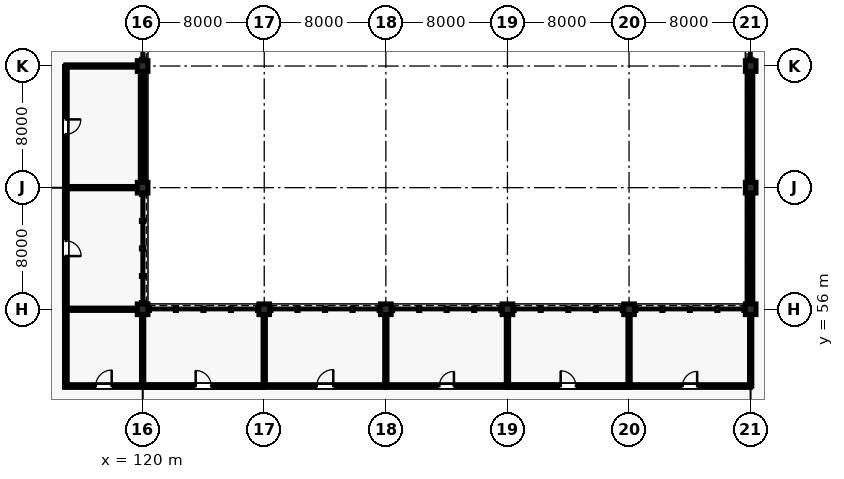
"""IFC4 building model, lengths in metres.
Left out: names, types, materials, properties, quantities, classifications, styles, units other than length and angle.
Written with IfcOpenShell. Run it as: python <this file> out.ifc"""

import sys

from ifc_helpers import new_model, si_unit, direction, frame, frame_2d, origin, origin_2d, place, context, subcontext, project, spatial, rectangle, extrude, element, fill, save


model = new_model("IFC4")
c1 = context("Model", 3, precision=1e-05, world=origin(), true_north=direction((0.0, 1.0)))
c2 = subcontext(c1, "Body", "Model", "MODEL_VIEW")
j1 = project(units=[si_unit("LENGTHUNIT", "METRE"), si_unit("PLANEANGLEUNIT", "RADIAN")], contexts=[c1])
p1 = place(None, origin())
s1 = spatial("IfcSite", under=j1, at=p1, CompositionType="ELEMENT")
p2 = place(p1, origin())
s2 = spatial("IfcBuilding", under=s1, at=p2, CompositionType="ELEMENT")
p3 = place(p2, origin())
s3 = spatial("IfcBuildingStorey", under=s2, at=p3, CompositionType="ELEMENT", Elevation=0.0)
for number, where, z_axis, x_axis in (
    (1, (120.0, 56.0, 0.0), (0.0, 0.0, 1.0), (1.0, 0.0, 0.0)),
    (2, (120.0, 64.0, 0.0), (0.0, 0.0, 1.0), (1.0, 0.0, 0.0)),
    (3, (120.0, 72.0, 0.0), (0.0, 0.0, 1.0), (1.0, 0.0, 0.0)),
    (4, (128.0, 56.0, 0.0), (0.0, 0.0, 1.0), (1.0, 0.0, 0.0)),
    (5, (136.0, 56.0, 0.0), (0.0, 0.0, 1.0), (1.0, 0.0, 0.0)),
    (6, (144.0, 56.0, 0.0), (0.0, 0.0, 1.0), (1.0, 0.0, 0.0)),
    (7, (152.0, 56.0, 0.0), (0.0, 0.0, 1.0), (1.0, 0.0, 0.0)),
    (8, (160.0, 56.0, 0.0), (0.0, 0.0, 1.0), (1.0, 0.0, 0.0)),
    (9, (160.0, 64.0, 0.0), (0.0, 0.0, 1.0), (1.0, 0.0, 0.0)),
    (10, (160.0, 72.0, 0.0), (0.0, 0.0, 1.0), (1.0, 0.0, 0.0)),
):
    element("IfcColumn", number, at=place(p3, frame(where, z_axis=z_axis, x_axis=x_axis)), inside=s3, PredefinedType="COLUMN", context=c2, shape_type="SweptSolid", body=[
        extrude(rectangle(XDim=0.7, YDim=0.7, at=origin_2d()), origin(), (0.0, 0.0, 1.0), 5.28),
    ])
p4 = place(p3, frame((120.0, 64.335, 0.0), z_axis=(0.0, 0.0, 1.0), x_axis=(0.0, 1.0, 0.0)))
e11 = element("IfcWall", 11, at=p4, inside=s3, PredefinedType="SOLIDWALL", context=c2, shape_type="SweptSolid", body=[
    extrude(rectangle(XDim=7.33, YDim=0.305, at=frame_2d((3.665, 0.0))), origin(), (0.0, 0.0, 1.0), 4.677),
])
p5 = place(p4, frame((2.74, 0.0, 0.9)))
e12 = element("IfcOpeningElement", 12, at=p5, cuts=e11, PredefinedType="OPENING", context=c2, shape_type="SweptSolid", body=[
    extrude(rectangle(XDim=1.85, YDim=2.65, at=frame_2d((0.925, 1.325))), frame((0.0, 0.162, 0.0), z_axis=(0.0, -1.0, 0.0), x_axis=(1.0, 0.0, 0.0)), (0.0, 0.0, 1.0), 0.325),
])
p6 = place(p3, frame((160.0, 56.335, 0.0), z_axis=(0.0, 0.0, 1.0), x_axis=(0.0, 1.0, 0.0)))
e13 = element("IfcWall", 13, at=p6, inside=s3, PredefinedType="SOLIDWALL", context=c2, shape_type="SweptSolid", body=[
    extrude(rectangle(XDim=7.33, YDim=0.28, at=frame_2d((3.665, 0.0))), origin(), (0.0, 0.0, 1.0), 4.682),
])
p7 = place(p6, frame((0.644, 0.0, 0.95)))
e14 = element("IfcOpeningElement", 14, at=p7, cuts=e13, PredefinedType="OPENING", context=c2, shape_type="SweptSolid", body=[
    extrude(rectangle(XDim=1.35, YDim=1.9, at=frame_2d((0.675, 0.95))), frame((0.0, 0.15, 0.0), z_axis=(0.0, -1.0, 0.0), x_axis=(1.0, 0.0, 0.0)), (0.0, 0.0, 1.0), 0.3),
])
p8 = place(p6, frame((5.336, 0.0, 0.95)))
e15 = element("IfcOpeningElement", 15, at=p8, cuts=e13, PredefinedType="OPENING", context=c2, shape_type="SweptSolid", body=[
    extrude(rectangle(XDim=1.35, YDim=1.9, at=frame_2d((0.675, 0.95))), frame((0.0, 0.15, 0.0), z_axis=(0.0, -1.0, 0.0), x_axis=(1.0, 0.0, 0.0)), (0.0, 0.0, 1.0), 0.3),
])
p9 = place(p3, frame((160.0, 64.335, 0.0), z_axis=(0.0, 0.0, 1.0), x_axis=(0.0, 1.0, 0.0)))
e16 = element("IfcWall", 16, at=p9, inside=s3, PredefinedType="SOLIDWALL", context=c2, shape_type="SweptSolid", body=[
    extrude(rectangle(XDim=7.33, YDim=0.28, at=frame_2d((3.665, 0.0))), origin(), (0.0, 0.0, 1.0), 4.615),
])
p10 = place(p9, frame((0.719, 0.0, 0.95)))
e17 = element("IfcOpeningElement", 17, at=p10, cuts=e16, PredefinedType="OPENING", context=c2, shape_type="SweptSolid", body=[
    extrude(rectangle(XDim=1.2, YDim=1.8, at=frame_2d((0.6, 0.9))), frame((0.0, 0.15, 0.0), z_axis=(0.0, -1.0, 0.0), x_axis=(1.0, 0.0, 0.0)), (0.0, 0.0, 1.0), 0.3),
])
p11 = place(p9, frame((5.411, 0.0, 0.95)))
e18 = element("IfcOpeningElement", 18, at=p11, cuts=e16, PredefinedType="OPENING", context=c2, shape_type="SweptSolid", body=[
    extrude(rectangle(XDim=1.2, YDim=1.8, at=frame_2d((0.6, 0.9))), frame((0.0, 0.15, 0.0), z_axis=(0.0, -1.0, 0.0), x_axis=(1.0, 0.0, 0.0)), (0.0, 0.0, 1.0), 0.3),
])
p12 = place(p3, frame((114.9, 50.95, 0.0), z_axis=(0.0, 0.0, 1.0), x_axis=(1.0, 0.0, 0.0)))
e19 = element("IfcWall", 19, at=p12, inside=s3, PredefinedType="PARTITIONING", context=c2, shape_type="SweptSolid", body=[
    extrude(rectangle(XDim=5.08, YDim=0.175, at=frame_2d((2.54, 0.0))), origin(), (0.0, 0.0, 1.0), 4.412),
])
p13 = place(p12, frame((2.015, 0.0, 0.0)))
e20 = element("IfcOpeningElement", 20, at=p13, cuts=e19, PredefinedType="OPENING", context=c2, shape_type="SweptSolid", body=[
    extrude(rectangle(XDim=1.05, YDim=2.15, at=frame_2d((0.525, 1.075))), frame((0.0, 0.097, 0.0), z_axis=(0.0, -1.0, 0.0), x_axis=(1.0, 0.0, 0.0)), (0.0, 0.0, 1.0), 0.195),
])
p14 = place(p3, frame((114.95, 50.9, 0.0), z_axis=(0.0, 0.0, 1.0), x_axis=(0.0, 1.0, 0.0)))
e21 = element("IfcWall", 21, at=p14, inside=s3, PredefinedType="PARTITIONING", context=c2, shape_type="SweptSolid", body=[
    extrude(rectangle(XDim=5.08, YDim=0.175, at=frame_2d((2.54, 0.0))), origin(), (0.0, 0.0, 1.0), 4.403),
])
p15 = place(p3, frame((114.95, 56.0, 0.0), z_axis=(0.0, 0.0, 1.0), x_axis=(1.0, 0.0, 0.0)))
e22 = element("IfcWall", 22, at=p15, inside=s3, PredefinedType="PARTITIONING", context=c2, shape_type="SweptSolid", body=[
    extrude(rectangle(XDim=4.69, YDim=0.15, at=frame_2d((2.345, 0.0))), origin(), (0.0, 0.0, 1.0), 4.403),
])
p16 = place(p3, frame((120.0, 50.95, 0.0), z_axis=(0.0, 0.0, 1.0), x_axis=(0.0, 1.0, 0.0)))
e23 = element("IfcWall", 23, at=p16, inside=s3, PredefinedType="PARTITIONING", context=c2, shape_type="SweptSolid", body=[
    extrude(rectangle(XDim=4.69, YDim=0.15, at=frame_2d((2.345, 0.0))), origin(), (0.0, 0.0, 1.0), 4.412),
])
p17 = place(p3, frame((114.95, 56.02, 0.0), z_axis=(0.0, 0.0, 1.0), x_axis=(0.0, 1.0, 0.0)))
e24 = element("IfcWall", 24, at=p17, inside=s3, PredefinedType="PARTITIONING", context=c2, shape_type="SweptSolid", body=[
    extrude(rectangle(XDim=7.96, YDim=0.185, at=frame_2d((3.98, 0.0))), origin(), (0.0, 0.0, 1.0), 4.336),
])
p18 = place(p17, frame((3.48, 0.0, 0.0)))
e25 = element("IfcOpeningElement", 25, at=p18, cuts=e24, PredefinedType="OPENING", context=c2, shape_type="SweptSolid", body=[
    extrude(rectangle(XDim=1.0, YDim=2.15, at=frame_2d((0.5, 1.075))), frame((0.0, 0.103, 0.0), z_axis=(0.0, -1.0, 0.0), x_axis=(1.0, 0.0, 0.0)), (0.0, 0.0, 1.0), 0.205),
])
p19 = place(p3, frame((114.95, 64.0, 0.0), z_axis=(0.0, 0.0, 1.0), x_axis=(1.0, 0.0, 0.0)))
e26 = element("IfcWall", 26, at=p19, inside=s3, PredefinedType="PARTITIONING", context=c2, shape_type="SweptSolid", body=[
    extrude(rectangle(XDim=4.69, YDim=0.15, at=frame_2d((2.345, 0.0))), origin(), (0.0, 0.0, 1.0), 4.336),
])
p20 = place(p3, frame((114.95, 64.02, 0.0), z_axis=(0.0, 0.0, 1.0), x_axis=(0.0, 1.0, 0.0)))
e27 = element("IfcWall", 27, at=p20, inside=s3, PredefinedType="PARTITIONING", context=c2, shape_type="SweptSolid", body=[
    extrude(rectangle(XDim=7.96, YDim=0.175, at=frame_2d((3.98, 0.0))), origin(), (0.0, 0.0, 1.0), 4.336),
])
p21 = place(p20, frame((3.49, 0.0, 0.0)))
e28 = element("IfcOpeningElement", 28, at=p21, cuts=e27, PredefinedType="OPENING", context=c2, shape_type="SweptSolid", body=[
    extrude(rectangle(XDim=0.98, YDim=2.15, at=frame_2d((0.49, 1.075))), frame((0.0, 0.097, 0.0), z_axis=(0.0, -1.0, 0.0), x_axis=(1.0, 0.0, 0.0)), (0.0, 0.0, 1.0), 0.195),
])
p22 = place(p3, frame((114.95, 72.0, 0.0), z_axis=(0.0, 0.0, 1.0), x_axis=(1.0, 0.0, 0.0)))
e29 = element("IfcWall", 29, at=p22, inside=s3, PredefinedType="PARTITIONING", context=c2, shape_type="SweptSolid", body=[
    extrude(rectangle(XDim=4.69, YDim=0.15, at=frame_2d((2.345, 0.0))), origin(), (0.0, 0.0, 1.0), 4.404),
])
p23 = place(p3, frame((120.02, 50.95, 0.0), z_axis=(0.0, 0.0, 1.0), x_axis=(1.0, 0.0, 0.0)))
e30 = element("IfcWall", 30, at=p23, inside=s3, PredefinedType="PARTITIONING", context=c2, shape_type="SweptSolid", body=[
    extrude(rectangle(XDim=7.96, YDim=0.185, at=frame_2d((3.98, 0.0))), origin(), (0.0, 0.0, 1.0), 4.404),
])
p24 = place(p23, frame((3.47, 0.0, 0.0)))
e31 = element("IfcOpeningElement", 31, at=p24, cuts=e30, PredefinedType="OPENING", context=c2, shape_type="SweptSolid", body=[
    extrude(rectangle(XDim=1.02, YDim=2.2, at=frame_2d((0.51, 1.1))), frame((0.0, 0.103, 0.0), z_axis=(0.0, -1.0, 0.0), x_axis=(1.0, 0.0, 0.0)), (0.0, 0.0, 1.0), 0.205),
])
p25 = place(p3, frame((128.0, 50.95, 0.0), z_axis=(0.0, 0.0, 1.0), x_axis=(0.0, 1.0, 0.0)))
e32 = element("IfcWall", 32, at=p25, inside=s3, PredefinedType="PARTITIONING", context=c2, shape_type="SweptSolid", body=[
    extrude(rectangle(XDim=4.69, YDim=0.15, at=frame_2d((2.345, 0.0))), origin(), (0.0, 0.0, 1.0), 4.404),
])
p26 = place(p3, frame((128.02, 50.95, 0.0), z_axis=(0.0, 0.0, 1.0), x_axis=(1.0, 0.0, 0.0)))
e33 = element("IfcWall", 33, at=p26, inside=s3, PredefinedType="PARTITIONING", context=c2, shape_type="SweptSolid", body=[
    extrude(rectangle(XDim=7.96, YDim=0.175, at=frame_2d((3.98, 0.0))), origin(), (0.0, 0.0, 1.0), 4.404),
])
p27 = place(p26, frame((3.44, 0.0, 0.0)))
e34 = element("IfcOpeningElement", 34, at=p27, cuts=e33, PredefinedType="OPENING", context=c2, shape_type="SweptSolid", body=[
    extrude(rectangle(XDim=1.08, YDim=2.2, at=frame_2d((0.54, 1.1))), frame((0.0, 0.097, 0.0), z_axis=(0.0, -1.0, 0.0), x_axis=(1.0, 0.0, 0.0)), (0.0, 0.0, 1.0), 0.195),
])
p28 = place(p3, frame((136.0, 50.95, 0.0), z_axis=(0.0, 0.0, 1.0), x_axis=(0.0, 1.0, 0.0)))
e35 = element("IfcWall", 35, at=p28, inside=s3, PredefinedType="PARTITIONING", context=c2, shape_type="SweptSolid", body=[
    extrude(rectangle(XDim=4.69, YDim=0.15, at=frame_2d((2.345, 0.0))), origin(), (0.0, 0.0, 1.0), 4.471),
])
p29 = place(p3, frame((136.02, 50.95, 0.0), z_axis=(0.0, 0.0, 1.0), x_axis=(1.0, 0.0, 0.0)))
e36 = element("IfcWall", 36, at=p29, inside=s3, PredefinedType="PARTITIONING", context=c2, shape_type="SweptSolid", body=[
    extrude(rectangle(XDim=7.96, YDim=0.175, at=frame_2d((3.98, 0.0))), origin(), (0.0, 0.0, 1.0), 4.403),
])
p30 = place(p29, frame((3.5, 0.0, 0.0)))
e37 = element("IfcOpeningElement", 37, at=p30, cuts=e36, PredefinedType="OPENING", context=c2, shape_type="SweptSolid", body=[
    extrude(rectangle(XDim=0.96, YDim=2.14, at=frame_2d((0.48, 1.07))), frame((0.0, 0.097, 0.0), z_axis=(0.0, -1.0, 0.0), x_axis=(1.0, 0.0, 0.0)), (0.0, 0.0, 1.0), 0.195),
])
p31 = place(p3, frame((144.0, 50.95, 0.0), z_axis=(0.0, 0.0, 1.0), x_axis=(0.0, 1.0, 0.0)))
e38 = element("IfcWall", 38, at=p31, inside=s3, PredefinedType="PARTITIONING", context=c2, shape_type="SweptSolid", body=[
    extrude(rectangle(XDim=4.69, YDim=0.15, at=frame_2d((2.345, 0.0))), origin(), (0.0, 0.0, 1.0), 4.403),
])
p32 = place(p3, frame((144.02, 50.95, 0.0), z_axis=(0.0, 0.0, 1.0), x_axis=(1.0, 0.0, 0.0)))
e39 = element("IfcWall", 39, at=p32, inside=s3, PredefinedType="PARTITIONING", context=c2, shape_type="SweptSolid", body=[
    extrude(rectangle(XDim=7.96, YDim=0.185, at=frame_2d((3.98, 0.0))), origin(), (0.0, 0.0, 1.0), 4.403),
])
p33 = place(p32, frame((3.48, 0.0, 0.0)))
e40 = element("IfcOpeningElement", 40, at=p33, cuts=e39, PredefinedType="OPENING", context=c2, shape_type="SweptSolid", body=[
    extrude(rectangle(XDim=1.0, YDim=2.15, at=frame_2d((0.5, 1.075))), frame((0.0, 0.103, 0.0), z_axis=(0.0, -1.0, 0.0), x_axis=(1.0, 0.0, 0.0)), (0.0, 0.0, 1.0), 0.205),
])
p34 = place(p3, frame((152.0, 50.95, 0.0), z_axis=(0.0, 0.0, 1.0), x_axis=(0.0, 1.0, 0.0)))
e41 = element("IfcWall", 41, at=p34, inside=s3, PredefinedType="PARTITIONING", context=c2, shape_type="SweptSolid", body=[
    extrude(rectangle(XDim=4.69, YDim=0.15, at=frame_2d((2.345, 0.0))), origin(), (0.0, 0.0, 1.0), 4.412),
])
p35 = place(p3, frame((152.02, 50.95, 0.0), z_axis=(0.0, 0.0, 1.0), x_axis=(1.0, 0.0, 0.0)))
e42 = element("IfcWall", 42, at=p35, inside=s3, PredefinedType="PARTITIONING", context=c2, shape_type="SweptSolid", body=[
    extrude(rectangle(XDim=7.96, YDim=0.175, at=frame_2d((3.98, 0.0))), origin(), (0.0, 0.0, 1.0), 4.404),
])
p36 = place(p35, frame((3.5, 0.0, 0.0)))
e43 = element("IfcOpeningElement", 43, at=p36, cuts=e42, PredefinedType="OPENING", context=c2, shape_type="SweptSolid", body=[
    extrude(rectangle(XDim=0.96, YDim=2.14, at=frame_2d((0.48, 1.07))), frame((0.0, 0.097, 0.0), z_axis=(0.0, -1.0, 0.0), x_axis=(1.0, 0.0, 0.0)), (0.0, 0.0, 1.0), 0.195),
])
p37 = place(p3, frame((160.0, 50.95, 0.0), z_axis=(0.0, 0.0, 1.0), x_axis=(0.0, 1.0, 0.0)))
e44 = element("IfcWall", 44, at=p37, inside=s3, PredefinedType="PARTITIONING", context=c2, shape_type="SweptSolid", body=[
    extrude(rectangle(XDim=4.69, YDim=0.15, at=frame_2d((2.345, 0.0))), origin(), (0.0, 0.0, 1.0), 4.404),
])
p38 = place(p5, origin())
e45 = element("IfcWindow", 45, at=p38, inside=s3, PartitioningType="SINGLE_PANEL", PredefinedType="WINDOW", context=c2, shape_type="SweptSolid", body=[
    extrude(rectangle(XDim=1.85, YDim=2.65, at=frame_2d((0.925, 1.325))), frame((0.0, 0.03, 0.0), z_axis=(0.0, -1.0, 0.0), x_axis=(1.0, 0.0, 0.0)), (0.0, 0.0, 1.0), 0.06),
])
fill(e12, e45)
p39 = place(p7, origin())
e46 = element("IfcWindow", 46, at=p39, inside=s3, PartitioningType="SINGLE_PANEL", PredefinedType="WINDOW", context=c2, shape_type="SweptSolid", body=[
    extrude(rectangle(XDim=1.35, YDim=1.9, at=frame_2d((0.675, 0.95))), frame((0.0, 0.03, 0.0), z_axis=(0.0, -1.0, 0.0), x_axis=(1.0, 0.0, 0.0)), (0.0, 0.0, 1.0), 0.06),
])
fill(e14, e46)
p40 = place(p8, origin())
e47 = element("IfcWindow", 47, at=p40, inside=s3, PartitioningType="SINGLE_PANEL", PredefinedType="WINDOW", context=c2, shape_type="SweptSolid", body=[
    extrude(rectangle(XDim=1.35, YDim=1.9, at=frame_2d((0.675, 0.95))), frame((0.0, 0.03, 0.0), z_axis=(0.0, -1.0, 0.0), x_axis=(1.0, 0.0, 0.0)), (0.0, 0.0, 1.0), 0.06),
])
fill(e15, e47)
p41 = place(p10, origin())
e48 = element("IfcWindow", 48, at=p41, inside=s3, PartitioningType="SINGLE_PANEL", PredefinedType="WINDOW", context=c2, shape_type="SweptSolid", body=[
    extrude(rectangle(XDim=1.2, YDim=1.8, at=frame_2d((0.6, 0.9))), frame((0.0, 0.03, 0.0), z_axis=(0.0, -1.0, 0.0), x_axis=(1.0, 0.0, 0.0)), (0.0, 0.0, 1.0), 0.06),
])
fill(e17, e48)
p42 = place(p11, origin())
e49 = element("IfcWindow", 49, at=p42, inside=s3, PartitioningType="SINGLE_PANEL", PredefinedType="WINDOW", context=c2, shape_type="SweptSolid", body=[
    extrude(rectangle(XDim=1.2, YDim=1.8, at=frame_2d((0.6, 0.9))), frame((0.0, 0.03, 0.0), z_axis=(0.0, -1.0, 0.0), x_axis=(1.0, 0.0, 0.0)), (0.0, 0.0, 1.0), 0.06),
])
fill(e18, e49)
p43 = place(p13, origin())
e50 = element("IfcDoor", 50, at=p43, inside=s3, OperationType="SINGLE_SWING_RIGHT", PredefinedType="DOOR", context=c2, shape_type="SweptSolid", body=[
    extrude(rectangle(XDim=1.05, YDim=2.15, at=frame_2d((0.525, 1.075))), frame((0.0, 0.025, 0.0), z_axis=(0.0, -1.0, 0.0), x_axis=(1.0, 0.0, 0.0)), (0.0, 0.0, 1.0), 0.05),
])
fill(e20, e50)
p44 = place(p18, frame((1.0, 0.0, 0.0), z_axis=(0.0, 0.0, 1.0), x_axis=(-1.0, 0.0, 0.0)))
e51 = element("IfcDoor", 51, at=p44, inside=s3, OperationType="SINGLE_SWING_LEFT", PredefinedType="DOOR", context=c2, shape_type="SweptSolid", body=[
    extrude(rectangle(XDim=1.0, YDim=2.15, at=frame_2d((0.5, 1.075))), frame((0.0, 0.025, 0.0), z_axis=(0.0, -1.0, 0.0), x_axis=(1.0, 0.0, 0.0)), (0.0, 0.0, 1.0), 0.05),
])
fill(e25, e51)
p45 = place(p21, frame((0.98, 0.0, 0.0), z_axis=(0.0, 0.0, 1.0), x_axis=(-1.0, 0.0, 0.0)))
e52 = element("IfcDoor", 52, at=p45, inside=s3, OperationType="SINGLE_SWING_RIGHT", PredefinedType="DOOR", context=c2, shape_type="SweptSolid", body=[
    extrude(rectangle(XDim=0.98, YDim=2.15, at=frame_2d((0.49, 1.075))), frame((0.0, 0.025, 0.0), z_axis=(0.0, -1.0, 0.0), x_axis=(1.0, 0.0, 0.0)), (0.0, 0.0, 1.0), 0.05),
])
fill(e28, e52)
p46 = place(p24, origin())
e53 = element("IfcDoor", 53, at=p46, inside=s3, OperationType="SINGLE_SWING_LEFT", PredefinedType="DOOR", context=c2, shape_type="SweptSolid", body=[
    extrude(rectangle(XDim=1.02, YDim=2.2, at=frame_2d((0.51, 1.1))), frame((0.0, 0.025, 0.0), z_axis=(0.0, -1.0, 0.0), x_axis=(1.0, 0.0, 0.0)), (0.0, 0.0, 1.0), 0.05),
])
fill(e31, e53)
p47 = place(p27, origin())
e54 = element("IfcDoor", 54, at=p47, inside=s3, OperationType="SINGLE_SWING_RIGHT", PredefinedType="DOOR", context=c2, shape_type="SweptSolid", body=[
    extrude(rectangle(XDim=1.08, YDim=2.2, at=frame_2d((0.54, 1.1))), frame((0.0, 0.025, 0.0), z_axis=(0.0, -1.0, 0.0), x_axis=(1.0, 0.0, 0.0)), (0.0, 0.0, 1.0), 0.05),
])
fill(e34, e54)
p48 = place(p30, origin())
e55 = element("IfcDoor", 55, at=p48, inside=s3, OperationType="SINGLE_SWING_RIGHT", PredefinedType="DOOR", context=c2, shape_type="SweptSolid", body=[
    extrude(rectangle(XDim=0.96, YDim=2.14, at=frame_2d((0.48, 1.07))), frame((0.0, 0.025, 0.0), z_axis=(0.0, -1.0, 0.0), x_axis=(1.0, 0.0, 0.0)), (0.0, 0.0, 1.0), 0.05),
])
fill(e37, e55)
p49 = place(p33, origin())
e56 = element("IfcDoor", 56, at=p49, inside=s3, OperationType="SINGLE_SWING_LEFT", PredefinedType="DOOR", context=c2, shape_type="SweptSolid", body=[
    extrude(rectangle(XDim=1.0, YDim=2.15, at=frame_2d((0.5, 1.075))), frame((0.0, 0.025, 0.0), z_axis=(0.0, -1.0, 0.0), x_axis=(1.0, 0.0, 0.0)), (0.0, 0.0, 1.0), 0.05),
])
fill(e40, e56)
p50 = place(p36, origin())
e57 = element("IfcDoor", 57, at=p50, inside=s3, OperationType="SINGLE_SWING_RIGHT", PredefinedType="DOOR", context=c2, shape_type="SweptSolid", body=[
    extrude(rectangle(XDim=0.96, YDim=2.14, at=frame_2d((0.48, 1.07))), frame((0.0, 0.025, 0.0), z_axis=(0.0, -1.0, 0.0), x_axis=(1.0, 0.0, 0.0)), (0.0, 0.0, 1.0), 0.05),
])
fill(e43, e57)
save(model, sys.argv[1])
